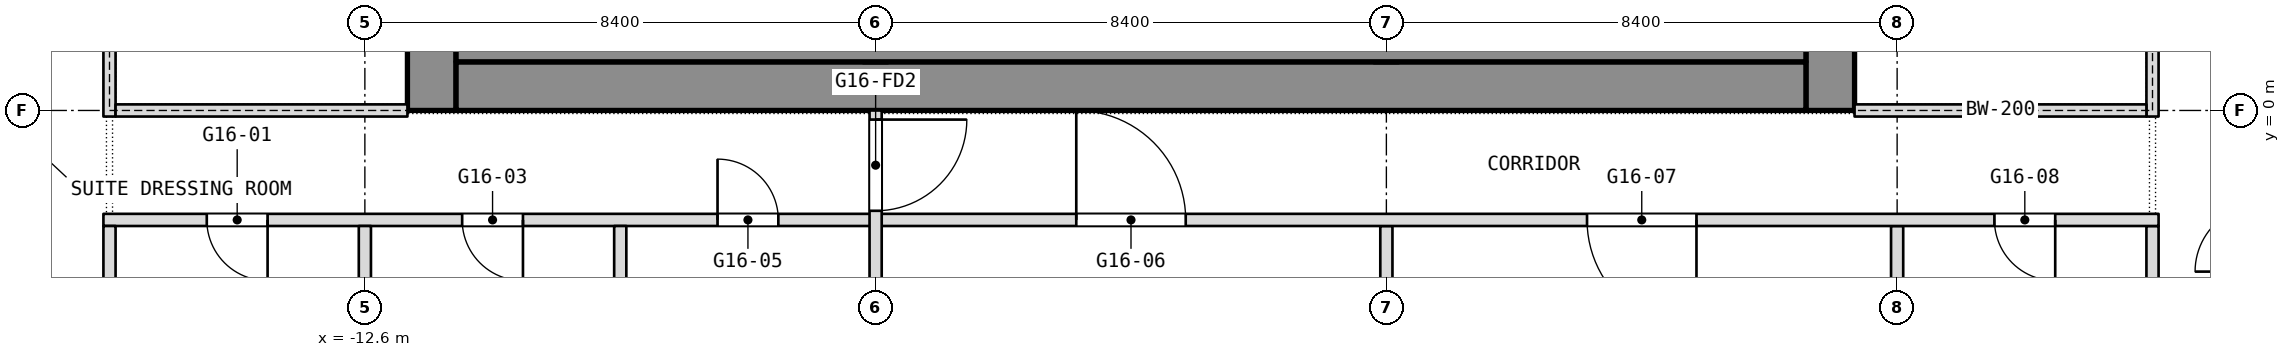
"""IFC4 building model, lengths in metres.
Left out: names, types, materials, properties, quantities, classifications, styles, units other than length and angle.
Written with IfcOpenShell. Run it as: python <this file> out.ifc"""

import sys

from ifc_helpers import new_model, si_unit, direction, frame, frame_2d, origin, place, context, subcontext, project, spatial, rectangle, extrude, element, fill, save


model = new_model("IFC4")
c1 = context("Model", 3, precision=1e-05, world=origin(), true_north=direction((0.0, 1.0)))
c2 = subcontext(c1, "Body", "Model", "MODEL_VIEW")
j1 = project(units=[si_unit("LENGTHUNIT", "METRE"), si_unit("PLANEANGLEUNIT", "RADIAN")], contexts=[c1])
p1 = place(None, origin())
s1 = spatial("IfcSite", under=j1, at=p1, CompositionType="ELEMENT")
p2 = place(p1, origin())
s2 = spatial("IfcBuilding", under=s1, at=p2, CompositionType="ELEMENT")
p3 = place(p2, frame((0.0, 0.0, 205.7)))
s3 = spatial("IfcBuildingStorey", under=s2, at=p3, CompositionType="ELEMENT", Elevation=205.7)
p4 = place(p3, frame((11.5, 0.0, 0.0), z_axis=(0.0, 0.0, 1.0), x_axis=(0.0, 1.0, 0.0)))
e1 = element("IfcWall", 1, at=p4, inside=s3, PredefinedType="SHEAR", context=c2, shape_type="SweptSolid", body=[
    extrude(rectangle(XDim=16.8, YDim=0.8, at=frame_2d((8.4, 0.0))), origin(), (0.0, 0.0, 1.0), 3.6),
])
p5 = place(p4, frame((2.3, 0.0, 0.0)))
e2 = element("IfcOpeningElement", 2, at=p5, cuts=e1, PredefinedType="OPENING", context=c2, shape_type="SweptSolid", body=[
    extrude(rectangle(XDim=1.1, YDim=2.1, at=frame_2d((0.55, 1.05))), frame((0.0, 0.4, 0.0), z_axis=(0.0, -1.0, 0.0), x_axis=(1.0, 0.0, 0.0)), (0.0, 0.0, 1.0), 0.8),
])
p6 = place(p4, frame((4.85, 0.0, 0.0)))
e3 = element("IfcOpeningElement", 3, at=p6, cuts=e1, PredefinedType="OPENING", context=c2, shape_type="SweptSolid", body=[
    extrude(rectangle(XDim=1.1, YDim=2.1, at=frame_2d((0.55, 1.05))), frame((0.0, 0.4, 0.0), z_axis=(0.0, -1.0, 0.0), x_axis=(1.0, 0.0, 0.0)), (0.0, 0.0, 1.0), 0.8),
])
p7 = place(p4, frame((6.825, 0.0, 0.0)))
e4 = element("IfcOpeningElement", 4, at=p7, cuts=e1, PredefinedType="OPENING", context=c2, shape_type="SweptSolid", body=[
    extrude(rectangle(XDim=1.2, YDim=2.1, at=frame_2d((0.6, 1.05))), frame((0.0, 0.4, 0.0), z_axis=(0.0, -1.0, 0.0), x_axis=(1.0, 0.0, 0.0)), (0.0, 0.0, 1.0), 0.8),
])
p8 = place(p4, frame((13.4, 0.0, 0.0)))
e5 = element("IfcOpeningElement", 5, at=p8, cuts=e1, PredefinedType="OPENING", context=c2, shape_type="SweptSolid", body=[
    extrude(rectangle(XDim=1.1, YDim=2.1, at=frame_2d((0.55, 1.05))), frame((0.0, 0.4, 0.0), z_axis=(0.0, -1.0, 0.0), x_axis=(1.0, 0.0, 0.0)), (0.0, 0.0, 1.0), 0.8),
])
p9 = place(p4, frame((10.85, 0.0, 0.0)))
e6 = element("IfcOpeningElement", 6, at=p9, cuts=e1, PredefinedType="OPENING", context=c2, shape_type="SweptSolid", body=[
    extrude(rectangle(XDim=1.1, YDim=2.1, at=frame_2d((0.55, 1.05))), frame((0.0, 0.4, 0.0), z_axis=(0.0, -1.0, 0.0), x_axis=(1.0, 0.0, 0.0)), (0.0, 0.0, 1.0), 0.8),
])
p10 = place(p4, frame((8.775, 0.0, 0.0)))
e7 = element("IfcOpeningElement", 7, at=p10, cuts=e1, PredefinedType="OPENING", context=c2, shape_type="SweptSolid", body=[
    extrude(rectangle(XDim=1.2, YDim=2.1, at=frame_2d((0.6, 1.05))), frame((0.0, 0.4, 0.0), z_axis=(0.0, -1.0, 0.0), x_axis=(1.0, 0.0, 0.0)), (0.0, 0.0, 1.0), 0.8),
])
p11 = place(p3, frame((-11.5, 0.0, 0.0), z_axis=(0.0, 0.0, 1.0), x_axis=(0.0, 1.0, 0.0)))
e8 = element("IfcWall", 8, at=p11, inside=s3, PredefinedType="SHEAR", context=c2, shape_type="SweptSolid", body=[
    extrude(rectangle(XDim=16.8, YDim=0.8, at=frame_2d((8.4, 0.0))), origin(), (0.0, 0.0, 1.0), 3.6),
])
p12 = place(p11, frame((3.6, 0.0, 0.0)))
e9 = element("IfcOpeningElement", 9, at=p12, cuts=e8, PredefinedType="OPENING", context=c2, shape_type="SweptSolid", body=[
    extrude(rectangle(XDim=0.9, YDim=2.1, at=frame_2d((0.45, 1.05))), frame((0.0, 0.4, 0.0), z_axis=(0.0, -1.0, 0.0), x_axis=(1.0, 0.0, 0.0)), (0.0, 0.0, 1.0), 0.8),
])
p13 = place(p11, frame((6.825, 0.0, 0.0)))
e10 = element("IfcOpeningElement", 10, at=p13, cuts=e8, PredefinedType="OPENING", context=c2, shape_type="SweptSolid", body=[
    extrude(rectangle(XDim=1.2, YDim=2.1, at=frame_2d((0.6, 1.05))), frame((0.0, 0.4, 0.0), z_axis=(0.0, -1.0, 0.0), x_axis=(1.0, 0.0, 0.0)), (0.0, 0.0, 1.0), 0.8),
])
p14 = place(p11, frame((14.062, 0.0, 0.0)))
e11 = element("IfcOpeningElement", 11, at=p14, cuts=e8, PredefinedType="OPENING", context=c2, shape_type="SweptSolid", body=[
    extrude(rectangle(XDim=0.9, YDim=2.1, at=frame_2d((0.45, 1.05))), frame((0.0, 0.4, 0.0), z_axis=(0.0, -1.0, 0.0), x_axis=(1.0, 0.0, 0.0)), (0.0, 0.0, 1.0), 0.8),
])
p15 = place(p11, frame((11.438, 0.0, 0.0)))
e12 = element("IfcOpeningElement", 12, at=p15, cuts=e8, PredefinedType="OPENING", context=c2, shape_type="SweptSolid", body=[
    extrude(rectangle(XDim=0.9, YDim=2.1, at=frame_2d((0.45, 1.05))), frame((0.0, 0.4, 0.0), z_axis=(0.0, -1.0, 0.0), x_axis=(1.0, 0.0, 0.0)), (0.0, 0.0, 1.0), 0.8),
])
p16 = place(p11, frame((8.775, 0.0, 0.0)))
e13 = element("IfcOpeningElement", 13, at=p16, cuts=e8, PredefinedType="OPENING", context=c2, shape_type="SweptSolid", body=[
    extrude(rectangle(XDim=1.2, YDim=2.1, at=frame_2d((0.6, 1.05))), frame((0.0, 0.4, 0.0), z_axis=(0.0, -1.0, 0.0), x_axis=(1.0, 0.0, 0.0)), (0.0, 0.0, 1.0), 0.8),
])
p17 = place(p3, frame((-11.1, 0.4, 0.0), z_axis=(0.0, 0.0, 1.0), x_axis=(1.0, 0.0, 0.0)))
e14 = element("IfcWall", 14, at=p17, inside=s3, PredefinedType="SHEAR", context=c2, shape_type="SweptSolid", body=[
    extrude(rectangle(XDim=22.2, YDim=0.8, at=frame_2d((11.1, 0.0))), origin(), (0.0, 0.0, 1.0), 3.6),
])
p18 = place(p3, frame((-4.2, 0.8, 0.0), z_axis=(0.0, 0.0, 1.0), x_axis=(0.0, 1.0, 0.0)))
e15 = element("IfcWall", 15, at=p18, inside=s3, PredefinedType="SHEAR", context=c2, shape_type="SweptSolid", body=[
    extrude(rectangle(XDim=15.2, YDim=0.4, at=frame_2d((7.6, 0.0))), origin(), (0.0, 0.0, 1.0), 3.6),
])
p19 = place(p18, frame((8.5, 0.0, 0.0)))
e16 = element("IfcOpeningElement", 16, at=p19, cuts=e15, PredefinedType="OPENING", context=c2, shape_type="SweptSolid", body=[
    extrude(rectangle(XDim=1.2, YDim=2.1, at=frame_2d((0.6, 1.05))), frame((0.0, 0.2, 0.0), z_axis=(0.0, -1.0, 0.0), x_axis=(1.0, 0.0, 0.0)), (0.0, 0.0, 1.0), 0.4),
])
p20 = place(p3, frame((4.2, 0.8, 0.0), z_axis=(0.0, 0.0, 1.0), x_axis=(0.0, 1.0, 0.0)))
e17 = element("IfcWall", 17, at=p20, inside=s3, PredefinedType="SHEAR", context=c2, shape_type="SweptSolid", body=[
    extrude(rectangle(XDim=15.2, YDim=0.4, at=frame_2d((7.6, 0.0))), origin(), (0.0, 0.0, 1.0), 3.6),
])
p21 = place(p20, frame((5.95, 0.0, 0.0)))
e18 = element("IfcOpeningElement", 18, at=p21, cuts=e17, PredefinedType="OPENING", context=c2, shape_type="SweptSolid", body=[
    extrude(rectangle(XDim=1.2, YDim=2.1, at=frame_2d((0.6, 1.05))), frame((0.0, 0.2, 0.0), z_axis=(0.0, -1.0, 0.0), x_axis=(1.0, 0.0, 0.0)), (0.0, 0.0, 1.0), 0.4),
])
for number, where, z_axis, x_axis in (
    (19, (16.8, -7.8, 0.0), (0.0, 0.0, 1.0), (0.0, 1.0, 0.0)),
    (20, (12.6, -7.8, 0.0), (0.0, 0.0, 1.0), (0.0, 1.0, 0.0)),
):
    element("IfcWall", number, at=place(p3, frame(where, z_axis=z_axis, x_axis=x_axis)), inside=s3, PredefinedType="PARTITIONING", context=c2, shape_type="SweptSolid", body=[
        extrude(rectangle(XDim=5.9, YDim=0.2, at=frame_2d((2.95, 0.0))), origin(), (0.0, 0.0, 1.0), 3.34),
    ])
p22 = place(p3, frame((4.2, -11.6, 0.0), z_axis=(0.0, 0.0, 1.0), x_axis=(0.0, 1.0, 0.0)))
e21 = element("IfcWall", 21, at=p22, inside=s3, PredefinedType="PARTITIONING", context=c2, shape_type="SweptSolid", body=[
    extrude(rectangle(XDim=9.7, YDim=0.2, at=frame_2d((4.85, 0.0))), origin(), (0.0, 0.0, 1.0), 3.34),
])
p23 = place(p3, frame((-16.9, -1.8, 0.0), z_axis=(0.0, 0.0, 1.0), x_axis=(1.0, 0.0, 0.0)))
e22 = element("IfcWall", 22, at=p23, inside=s3, PredefinedType="PARTITIONING", context=c2, shape_type="SweptSolid", body=[
    extrude(rectangle(XDim=33.8, YDim=0.2, at=frame_2d((16.9, 0.0))), origin(), (0.0, 0.0, 1.0), 3.34),
])
p24 = place(p23, frame((1.7, 0.0, 0.0)))
e23 = element("IfcOpeningElement", 23, at=p24, cuts=e22, PredefinedType="OPENING", context=c2, shape_type="SweptSolid", body=[
    extrude(rectangle(XDim=1.0, YDim=2.1, at=frame_2d((0.5, 1.05))), frame((0.0, 0.1, 0.0), z_axis=(0.0, -1.0, 0.0), x_axis=(1.0, 0.0, 0.0)), (0.0, 0.0, 1.0), 0.2),
])
p25 = place(p23, frame((5.9, 0.0, 0.0)))
e24 = element("IfcOpeningElement", 24, at=p25, cuts=e22, PredefinedType="OPENING", context=c2, shape_type="SweptSolid", body=[
    extrude(rectangle(XDim=1.0, YDim=2.1, at=frame_2d((0.5, 1.05))), frame((0.0, 0.1, 0.0), z_axis=(0.0, -1.0, 0.0), x_axis=(1.0, 0.0, 0.0)), (0.0, 0.0, 1.0), 0.2),
])
p26 = place(p23, frame((10.1, 0.0, 0.0)))
e25 = element("IfcOpeningElement", 25, at=p26, cuts=e22, PredefinedType="OPENING", context=c2, shape_type="SweptSolid", body=[
    extrude(rectangle(XDim=1.0, YDim=2.1, at=frame_2d((0.5, 1.05))), frame((0.0, 0.1, 0.0), z_axis=(0.0, -1.0, 0.0), x_axis=(1.0, 0.0, 0.0)), (0.0, 0.0, 1.0), 0.2),
])
p27 = place(p23, frame((16.0, 0.0, 0.0)))
e26 = element("IfcOpeningElement", 26, at=p27, cuts=e22, PredefinedType="OPENING", context=c2, shape_type="SweptSolid", body=[
    extrude(rectangle(XDim=1.8, YDim=2.1, at=frame_2d((0.9, 1.05))), frame((0.0, 0.1, 0.0), z_axis=(0.0, -1.0, 0.0), x_axis=(1.0, 0.0, 0.0)), (0.0, 0.0, 1.0), 0.2),
])
p28 = place(p23, frame((24.4, 0.0, 0.0)))
e27 = element("IfcOpeningElement", 27, at=p28, cuts=e22, PredefinedType="OPENING", context=c2, shape_type="SweptSolid", body=[
    extrude(rectangle(XDim=1.8, YDim=2.1, at=frame_2d((0.9, 1.05))), frame((0.0, 0.1, 0.0), z_axis=(0.0, -1.0, 0.0), x_axis=(1.0, 0.0, 0.0)), (0.0, 0.0, 1.0), 0.2),
])
p29 = place(p23, frame((31.1, 0.0, 0.0)))
e28 = element("IfcOpeningElement", 28, at=p29, cuts=e22, PredefinedType="OPENING", context=c2, shape_type="SweptSolid", body=[
    extrude(rectangle(XDim=1.0, YDim=2.1, at=frame_2d((0.5, 1.05))), frame((0.0, 0.1, 0.0), z_axis=(0.0, -1.0, 0.0), x_axis=(1.0, 0.0, 0.0)), (0.0, 0.0, 1.0), 0.2),
])
p30 = place(p3, frame((-4.2, -13.6, 0.0), z_axis=(0.0, 0.0, 1.0), x_axis=(0.0, 1.0, 0.0)))
e29 = element("IfcWall", 29, at=p30, inside=s3, PredefinedType="PARTITIONING", context=c2, shape_type="SweptSolid", body=[
    extrude(rectangle(XDim=13.6, YDim=0.2, at=frame_2d((6.8, 0.0))), origin(), (0.0, 0.0, 1.0), 3.34),
])
p31 = place(p30, frame((11.95, 0.0, 0.0)))
e30 = element("IfcOpeningElement", 30, at=p31, cuts=e29, PredefinedType="OPENING", context=c2, shape_type="SweptSolid", body=[
    extrude(rectangle(XDim=1.5, YDim=2.1, at=frame_2d((0.75, 1.05))), frame((0.0, 0.1, 0.0), z_axis=(0.0, -1.0, 0.0), x_axis=(1.0, 0.0, 0.0)), (0.0, 0.0, 1.0), 0.2),
])
p32 = place(p30, frame((0.25, 0.0, 0.0)))
e31 = element("IfcOpeningElement", 31, at=p32, cuts=e29, PredefinedType="OPENING", context=c2, shape_type="SweptSolid", body=[
    extrude(rectangle(XDim=1.5, YDim=2.1, at=frame_2d((0.75, 1.05))), frame((0.0, 0.1, 0.0), z_axis=(0.0, -1.0, 0.0), x_axis=(1.0, 0.0, 0.0)), (0.0, 0.0, 1.0), 0.2),
])
p33 = place(p3, frame((-8.4, -8.0, 0.0), z_axis=(0.0, 0.0, 1.0), x_axis=(0.0, 1.0, 0.0)))
e32 = element("IfcWall", 32, at=p33, inside=s3, PredefinedType="PARTITIONING", context=c2, shape_type="SweptSolid", body=[
    extrude(rectangle(XDim=6.1, YDim=0.2, at=frame_2d((3.05, 0.0))), origin(), (0.0, 0.0, 1.0), 3.34),
])
p34 = place(p3, frame((-12.6, -7.8, 0.0), z_axis=(0.0, 0.0, 1.0), x_axis=(0.0, 1.0, 0.0)))
e33 = element("IfcWall", 33, at=p34, inside=s3, PredefinedType="PARTITIONING", context=c2, shape_type="SweptSolid", body=[
    extrude(rectangle(XDim=5.9, YDim=0.2, at=frame_2d((2.95, 0.0))), origin(), (0.0, 0.0, 1.0), 3.34),
])
p35 = place(p3, frame((-16.8, -8.0, 0.0), z_axis=(0.0, 0.0, 1.0), x_axis=(0.0, 1.0, 0.0)))
e34 = element("IfcWall", 34, at=p35, inside=s3, PredefinedType="PARTITIONING", context=c2, shape_type="SweptSolid", body=[
    extrude(rectangle(XDim=6.1, YDim=0.2, at=frame_2d((3.05, 0.0))), origin(), (0.0, 0.0, 1.0), 3.34),
])
p36 = place(p3, frame((-11.1, 1.15, 0.0), z_axis=(0.0, 0.0, 1.0), x_axis=(1.0, 0.0, 0.0)))
e35 = element("IfcWall", 35, at=p36, inside=s3, PredefinedType="PARTITIONING", context=c2, shape_type="SweptSolid", body=[
    extrude(rectangle(XDim=22.2, YDim=0.7, at=frame_2d((11.1, 0.0))), origin(), (0.0, 0.0, 1.0), 3.34),
])
p37 = place(p3, frame((-16.8, -0.1, 0.0), z_axis=(0.0, 0.0, 1.0), x_axis=(0.0, 1.0, 0.0)))
e36 = element("IfcWall", 36, at=p37, inside=s3, PredefinedType="PARTITIONING", context=c2, shape_type="SweptSolid", body=[
    extrude(rectangle(XDim=17.0, YDim=0.2, at=frame_2d((8.5, 0.0))), origin(), (0.0, 0.0, 1.0), 3.34),
])
p38 = place(p37, frame((2.2, 0.0, 0.0)))
e37 = element("IfcOpeningElement", 37, at=p38, cuts=e36, PredefinedType="OPENING", context=c2, shape_type="SweptSolid", body=[
    extrude(rectangle(XDim=1.8, YDim=2.1, at=frame_2d((0.9, 1.05))), frame((0.0, 0.1, 0.0), z_axis=(0.0, -1.0, 0.0), x_axis=(1.0, 0.0, 0.0)), (0.0, 0.0, 1.0), 0.2),
])
p39 = place(p37, frame((13.0, 0.0, 0.0)))
e38 = element("IfcOpeningElement", 38, at=p39, cuts=e36, PredefinedType="OPENING", context=c2, shape_type="SweptSolid", body=[
    extrude(rectangle(XDim=1.8, YDim=2.1, at=frame_2d((0.9, 1.05))), frame((0.0, 0.1, 0.0), z_axis=(0.0, -1.0, 0.0), x_axis=(1.0, 0.0, 0.0)), (0.0, 0.0, 1.0), 0.2),
])
p40 = place(p3, frame((-16.7, 0.0, 0.0), z_axis=(0.0, 0.0, 1.0), x_axis=(1.0, 0.0, 0.0)))
e39 = element("IfcWall", 39, at=p40, inside=s3, PredefinedType="PARTITIONING", context=c2, shape_type="SweptSolid", body=[
    extrude(rectangle(XDim=4.8, YDim=0.2, at=frame_2d((2.4, 0.0))), origin(), (0.0, 0.0, 1.0), 2.94),
])
p41 = place(p3, frame((16.8, -0.1, 0.0), z_axis=(0.0, 0.0, 1.0), x_axis=(0.0, 1.0, 0.0)))
e40 = element("IfcWall", 40, at=p41, inside=s3, PredefinedType="PARTITIONING", context=c2, shape_type="SweptSolid", body=[
    extrude(rectangle(XDim=17.0, YDim=0.2, at=frame_2d((8.5, 0.0))), origin(), (0.0, 0.0, 1.0), 3.34),
])
p42 = place(p41, frame((2.2, 0.0, 0.0)))
e41 = element("IfcOpeningElement", 41, at=p42, cuts=e40, PredefinedType="OPENING", context=c2, shape_type="SweptSolid", body=[
    extrude(rectangle(XDim=1.8, YDim=2.1, at=frame_2d((0.9, 1.05))), frame((0.0, 0.1, 0.0), z_axis=(0.0, -1.0, 0.0), x_axis=(1.0, 0.0, 0.0)), (0.0, 0.0, 1.0), 0.2),
])
p43 = place(p41, frame((13.0, 0.0, 0.0)))
e42 = element("IfcOpeningElement", 42, at=p43, cuts=e40, PredefinedType="OPENING", context=c2, shape_type="SweptSolid", body=[
    extrude(rectangle(XDim=1.8, YDim=2.1, at=frame_2d((0.9, 1.05))), frame((0.0, 0.1, 0.0), z_axis=(0.0, -1.0, 0.0), x_axis=(1.0, 0.0, 0.0)), (0.0, 0.0, 1.0), 0.2),
])
p44 = place(p3, frame((11.9, 0.0, 0.0), z_axis=(0.0, 0.0, 1.0), x_axis=(1.0, 0.0, 0.0)))
e43 = element("IfcWall", 43, at=p44, inside=s3, PredefinedType="PARTITIONING", context=c2, shape_type="SweptSolid", body=[
    extrude(rectangle(XDim=4.8, YDim=0.2, at=frame_2d((2.4, 0.0))), origin(), (0.0, 0.0, 1.0), 2.94),
])
p45 = place(p24, origin())
e44 = element("IfcDoor", 44, at=p45, inside=s3, OperationType="SINGLE_SWING_LEFT", PredefinedType="DOOR", context=c2, shape_type="SweptSolid", body=[
    extrude(rectangle(XDim=1.0, YDim=2.1, at=frame_2d((0.5, 1.05))), frame((0.0, 0.025, 0.0), z_axis=(0.0, -1.0, 0.0), x_axis=(1.0, 0.0, 0.0)), (0.0, 0.0, 1.0), 0.05),
])
fill(e23, e44)
p46 = place(p25, origin())
e45 = element("IfcDoor", 45, at=p46, inside=s3, OperationType="SINGLE_SWING_LEFT", PredefinedType="DOOR", context=c2, shape_type="SweptSolid", body=[
    extrude(rectangle(XDim=1.0, YDim=2.1, at=frame_2d((0.5, 1.05))), frame((0.0, 0.025, 0.0), z_axis=(0.0, -1.0, 0.0), x_axis=(1.0, 0.0, 0.0)), (0.0, 0.0, 1.0), 0.05),
])
fill(e24, e45)
p47 = place(p26, origin())
e46 = element("IfcDoor", 46, at=p47, inside=s3, OperationType="SINGLE_SWING_RIGHT", PredefinedType="DOOR", context=c2, shape_type="SweptSolid", body=[
    extrude(rectangle(XDim=1.0, YDim=2.1, at=frame_2d((0.5, 1.05))), frame((0.0, 0.025, 0.0), z_axis=(0.0, -1.0, 0.0), x_axis=(1.0, 0.0, 0.0)), (0.0, 0.0, 1.0), 0.05),
])
fill(e25, e46)
p48 = place(p27, origin())
e47 = element("IfcDoor", 47, at=p48, inside=s3, OperationType="DOUBLE_DOOR_SINGLE_SWING", PredefinedType="DOOR", context=c2, shape_type="SweptSolid", body=[
    extrude(rectangle(XDim=1.8, YDim=2.1, at=frame_2d((0.9, 1.05))), frame((0.0, 0.025, 0.0), z_axis=(0.0, -1.0, 0.0), x_axis=(1.0, 0.0, 0.0)), (0.0, 0.0, 1.0), 0.05),
])
fill(e26, e47)
p49 = place(p28, origin())
e48 = element("IfcDoor", 48, at=p49, inside=s3, OperationType="DOUBLE_DOOR_SINGLE_SWING", PredefinedType="DOOR", context=c2, shape_type="SweptSolid", body=[
    extrude(rectangle(XDim=1.8, YDim=2.1, at=frame_2d((0.9, 1.05))), frame((0.0, 0.025, 0.0), z_axis=(0.0, -1.0, 0.0), x_axis=(1.0, 0.0, 0.0)), (0.0, 0.0, 1.0), 0.05),
])
fill(e27, e48)
p50 = place(p29, origin())
e49 = element("IfcDoor", 49, at=p50, inside=s3, OperationType="SINGLE_SWING_LEFT", PredefinedType="DOOR", context=c2, shape_type="SweptSolid", body=[
    extrude(rectangle(XDim=1.0, YDim=2.1, at=frame_2d((0.5, 1.05))), frame((0.0, 0.025, 0.0), z_axis=(0.0, -1.0, 0.0), x_axis=(1.0, 0.0, 0.0)), (0.0, 0.0, 1.0), 0.05),
])
fill(e28, e49)
p51 = place(p31, origin())
e50 = element("IfcDoor", 50, at=p51, inside=s3, OperationType="DOUBLE_DOOR_DOUBLE_SWING", PredefinedType="DOOR", context=c2, shape_type="SweptSolid", body=[
    extrude(rectangle(XDim=1.5, YDim=2.1, at=frame_2d((0.75, 1.05))), frame((0.0, 0.025, 0.0), z_axis=(0.0, -1.0, 0.0), x_axis=(1.0, 0.0, 0.0)), (0.0, 0.0, 1.0), 0.05),
])
fill(e30, e50)
save(model, sys.argv[1])
